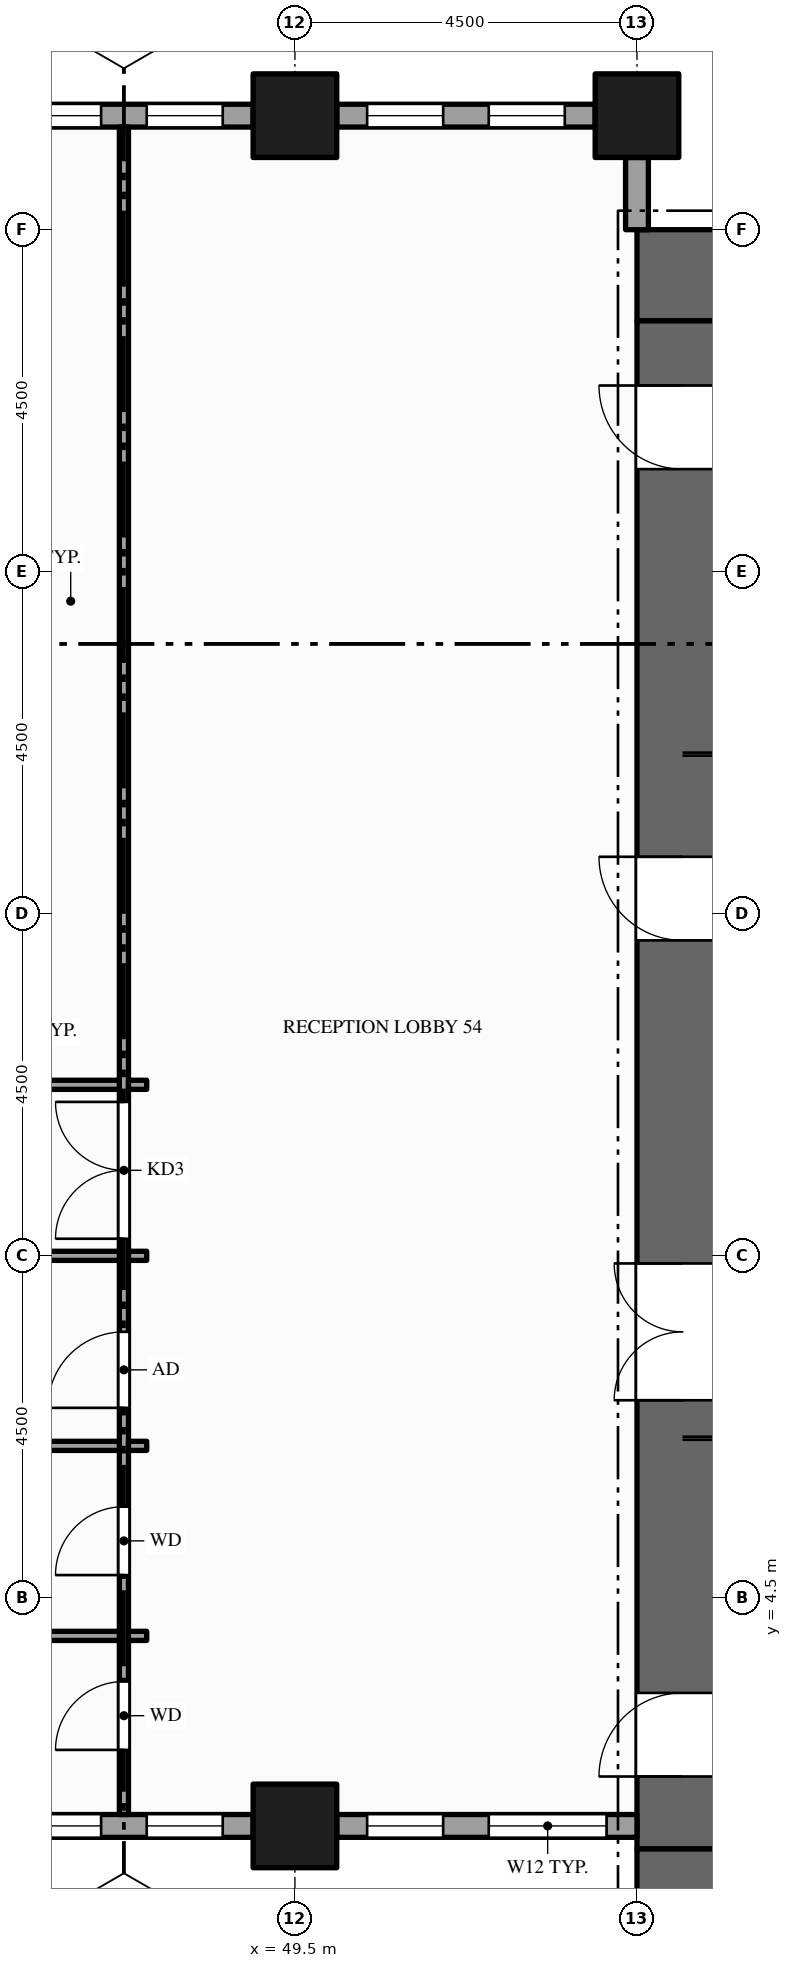
"""IFC4 building model, lengths in metres.
Left out: names, types, materials, properties, quantities, classifications, styles, units other than length and angle.
Written with IfcOpenShell. Run it as: python <this file> out.ifc"""

import sys

from ifc_helpers import new_model, si_unit, direction, frame, frame_2d, origin, origin_2d, place, context, subcontext, project, spatial, rectangle, hollow_rectangle, extrude, element, fill, save


model = new_model("IFC4")
c1 = context("Model", 3, precision=1e-05, world=origin(), true_north=direction((0.0, 1.0)))
c2 = subcontext(c1, "Body", "Model", "MODEL_VIEW")
j1 = project(units=[si_unit("LENGTHUNIT", "METRE"), si_unit("PLANEANGLEUNIT", "RADIAN")], contexts=[c1])
p1 = place(None, origin())
s1 = spatial("IfcSite", under=j1, at=p1, CompositionType="ELEMENT")
p2 = place(p1, origin())
s2 = spatial("IfcBuilding", under=s1, at=p2, CompositionType="ELEMENT")
p3 = place(p2, frame((0.0, 0.0, 73.0)))
s3 = spatial("IfcBuildingStorey", under=s2, at=p3, CompositionType="ELEMENT", Elevation=73.0)
for number, where, z_axis, x_axis in (
    (1, (67.5, 0.6, -0.15), (0.0, 0.0, 1.0), (-1.0, 0.0, 0.0)),
    (2, (54.0, 21.9, -0.15), (0.0, 0.0, 1.0), (1.0, 0.0, 0.0)),
):
    element("IfcWall", number, at=place(p3, frame(where, z_axis=z_axis, x_axis=x_axis)), inside=s3, PredefinedType="SHEAR", context=c2, shape_type="SweptSolid", body=[
        extrude(rectangle(XDim=13.5, YDim=1.2, at=frame_2d((6.75, 0.0))), origin(), (0.0, 0.0, 1.0), 4.0),
    ])
p4 = place(p3, frame((54.6, 1.2, -0.15), z_axis=(0.0, 0.0, 1.0), x_axis=(0.0, 1.0, 0.0)))
e3 = element("IfcWall", 3, at=p4, inside=s3, PredefinedType="SHEAR", context=c2, shape_type="SweptSolid", body=[
    extrude(rectangle(XDim=20.1, YDim=1.2, at=frame_2d((10.05, 0.0))), origin(), (0.0, 0.0, 1.0), 4.0),
])
p5 = place(p4, frame((5.9, 0.0, 0.15)))
e4 = element("IfcOpeningElement", 4, at=p5, cuts=e3, PredefinedType="OPENING", context=c2, shape_type="SweptSolid", body=[
    extrude(rectangle(XDim=1.8, YDim=2.1, at=frame_2d((0.9, 1.05))), frame((0.0, 0.61, 0.0), z_axis=(0.0, -1.0, 0.0), x_axis=(1.0, 0.0, 0.0)), (0.0, 0.0, 1.0), 1.22),
])
p6 = place(p4, frame((11.95, 0.0, 0.15)))
e5 = element("IfcOpeningElement", 5, at=p6, cuts=e3, PredefinedType="OPENING", context=c2, shape_type="SweptSolid", body=[
    extrude(rectangle(XDim=1.1, YDim=2.1, at=frame_2d((0.55, 1.05))), frame((0.0, 0.61, 0.0), z_axis=(0.0, -1.0, 0.0), x_axis=(1.0, 0.0, 0.0)), (0.0, 0.0, 1.0), 1.22),
])
p7 = place(p4, frame((0.95, 0.0, 0.15)))
e6 = element("IfcOpeningElement", 6, at=p7, cuts=e3, PredefinedType="OPENING", context=c2, shape_type="SweptSolid", body=[
    extrude(rectangle(XDim=1.1, YDim=2.1, at=frame_2d((0.55, 1.05))), frame((0.0, 0.61, 0.0), z_axis=(0.0, -1.0, 0.0), x_axis=(1.0, 0.0, 0.0)), (0.0, 0.0, 1.0), 1.22),
])
p8 = place(p4, frame((18.15, 0.0, 0.15)))
e7 = element("IfcOpeningElement", 7, at=p8, cuts=e3, PredefinedType="OPENING", context=c2, shape_type="SweptSolid", body=[
    extrude(rectangle(XDim=1.1, YDim=2.1, at=frame_2d((0.55, 1.05))), frame((0.0, 0.61, 0.0), z_axis=(0.0, -1.0, 0.0), x_axis=(1.0, 0.0, 0.0)), (0.0, 0.0, 1.0), 1.22),
])
for number, where, z_axis, x_axis in (
    (8, (49.5, 1.5, -0.15), (0.0, 0.0, 1.0), (1.0, 0.0, 0.0)),
    (9, (49.5, 24.0, -0.15), (0.0, 0.0, 1.0), (1.0, 0.0, 0.0)),
    (10, (54.0, 24.0, -0.15), (0.0, 0.0, 1.0), (1.0, 0.0, 0.0)),
):
    element("IfcColumn", number, at=place(p3, frame(where, z_axis=z_axis, x_axis=x_axis)), inside=s3, PredefinedType="COLUMN", context=c2, shape_type="SweptSolid", body=[
        extrude(hollow_rectangle(XDim=1.1, YDim=1.1, WallThickness=0.06, at=origin_2d()), origin(), (0.0, 0.0, 1.0), 3.9),
    ])
p9 = place(p3, frame((45.55, 1.5, 0.0), z_axis=(0.0, 0.0, 1.0), x_axis=(1.0, 0.0, 0.0)))
e11 = element("IfcWall", 11, at=p9, inside=s3, PredefinedType="STANDARD", context=c2, shape_type="SweptSolid", body=[
    extrude(rectangle(XDim=3.4, YDim=0.3, at=frame_2d((1.7, 0.0))), origin(), (0.0, 0.0, 1.0), 2.838),
])
p10 = place(p9, frame((0.4, 0.0, 0.9)))
e12 = element("IfcOpeningElement", 12, at=p10, cuts=e11, PredefinedType="OPENING", context=c2, shape_type="SweptSolid", body=[
    extrude(rectangle(XDim=1.0, YDim=1.75, at=frame_2d((0.5, 0.875))), frame((0.0, 0.16, 0.0), z_axis=(0.0, -1.0, 0.0), x_axis=(1.0, 0.0, 0.0)), (0.0, 0.0, 1.0), 0.32),
])
p11 = place(p9, frame((2.0, 0.0, 0.9)))
e13 = element("IfcOpeningElement", 13, at=p11, cuts=e11, PredefinedType="OPENING", context=c2, shape_type="SweptSolid", body=[
    extrude(rectangle(XDim=1.0, YDim=1.75, at=frame_2d((0.5, 0.875))), frame((0.0, 0.16, 0.0), z_axis=(0.0, -1.0, 0.0), x_axis=(1.0, 0.0, 0.0)), (0.0, 0.0, 1.0), 0.32),
])
p12 = place(p3, frame((50.05, 1.5, 0.0), z_axis=(0.0, 0.0, 1.0), x_axis=(1.0, 0.0, 0.0)))
e14 = element("IfcWall", 14, at=p12, inside=s3, PredefinedType="STANDARD", context=c2, shape_type="SweptSolid", body=[
    extrude(rectangle(XDim=3.95, YDim=0.3, at=frame_2d((1.975, 0.0))), origin(), (0.0, 0.0, 1.0), 2.838),
])
p13 = place(p12, frame((0.4, 0.0, 0.9)))
e15 = element("IfcOpeningElement", 15, at=p13, cuts=e14, PredefinedType="OPENING", context=c2, shape_type="SweptSolid", body=[
    extrude(rectangle(XDim=1.0, YDim=1.75, at=frame_2d((0.5, 0.875))), frame((0.0, 0.16, 0.0), z_axis=(0.0, -1.0, 0.0), x_axis=(1.0, 0.0, 0.0)), (0.0, 0.0, 1.0), 0.32),
])
p14 = place(p12, frame((2.0, 0.0, 0.9)))
e16 = element("IfcOpeningElement", 16, at=p14, cuts=e14, PredefinedType="OPENING", context=c2, shape_type="SweptSolid", body=[
    extrude(rectangle(XDim=1.55, YDim=1.75, at=frame_2d((0.775, 0.875))), frame((0.0, 0.16, 0.0), z_axis=(0.0, -1.0, 0.0), x_axis=(1.0, 0.0, 0.0)), (0.0, 0.0, 1.0), 0.32),
])
p15 = place(p3, frame((54.0, 22.5, 0.0), z_axis=(0.0, 0.0, 1.0), x_axis=(0.0, 1.0, 0.0)))
e17 = element("IfcWall", 17, at=p15, inside=s3, PredefinedType="STANDARD", context=c2, shape_type="SweptSolid", body=[
    extrude(rectangle(XDim=0.95, YDim=0.3, at=frame_2d((0.475, 0.0))), origin(), (0.0, 0.0, 1.0), 3.044),
])
p16 = place(p3, frame((53.45, 24.0, 0.0), z_axis=(0.0, 0.0, 1.0), x_axis=(-1.0, 0.0, 0.0)))
e18 = element("IfcWall", 18, at=p16, inside=s3, PredefinedType="STANDARD", context=c2, shape_type="SweptSolid", body=[
    extrude(rectangle(XDim=3.4, YDim=0.3, at=frame_2d((1.7, 0.0))), origin(), (0.0, 0.0, 1.0), 3.044),
])
p17 = place(p16, frame((0.4, 0.0, 0.9)))
e19 = element("IfcOpeningElement", 19, at=p17, cuts=e18, PredefinedType="OPENING", context=c2, shape_type="SweptSolid", body=[
    extrude(rectangle(XDim=1.0, YDim=2.0, at=frame_2d((0.5, 1.0))), frame((0.0, 0.16, 0.0), z_axis=(0.0, -1.0, 0.0), x_axis=(1.0, 0.0, 0.0)), (0.0, 0.0, 1.0), 0.32),
])
p18 = place(p16, frame((2.0, 0.0, 0.9)))
e20 = element("IfcOpeningElement", 20, at=p18, cuts=e18, PredefinedType="OPENING", context=c2, shape_type="SweptSolid", body=[
    extrude(rectangle(XDim=1.0, YDim=2.0, at=frame_2d((0.5, 1.0))), frame((0.0, 0.16, 0.0), z_axis=(0.0, -1.0, 0.0), x_axis=(1.0, 0.0, 0.0)), (0.0, 0.0, 1.0), 0.32),
])
p19 = place(p3, frame((48.95, 24.0, 0.0), z_axis=(0.0, 0.0, 1.0), x_axis=(-1.0, 0.0, 0.0)))
e21 = element("IfcWall", 21, at=p19, inside=s3, PredefinedType="STANDARD", context=c2, shape_type="SweptSolid", body=[
    extrude(rectangle(XDim=3.4, YDim=0.3, at=frame_2d((1.7, 0.0))), origin(), (0.0, 0.0, 1.0), 3.044),
])
p20 = place(p19, frame((0.4, 0.0, 0.9)))
e22 = element("IfcOpeningElement", 22, at=p20, cuts=e21, PredefinedType="OPENING", context=c2, shape_type="SweptSolid", body=[
    extrude(rectangle(XDim=1.0, YDim=2.0, at=frame_2d((0.5, 1.0))), frame((0.0, 0.16, 0.0), z_axis=(0.0, -1.0, 0.0), x_axis=(1.0, 0.0, 0.0)), (0.0, 0.0, 1.0), 0.32),
])
p21 = place(p19, frame((2.0, 0.0, 0.9)))
e23 = element("IfcOpeningElement", 23, at=p21, cuts=e21, PredefinedType="OPENING", context=c2, shape_type="SweptSolid", body=[
    extrude(rectangle(XDim=1.0, YDim=2.0, at=frame_2d((0.5, 1.0))), frame((0.0, 0.16, 0.0), z_axis=(0.0, -1.0, 0.0), x_axis=(1.0, 0.0, 0.0)), (0.0, 0.0, 1.0), 0.32),
])
p22 = place(p3, frame((47.25, 1.65, 0.0), z_axis=(0.0, 0.0, 1.0), x_axis=(0.0, 1.0, 0.0)))
e24 = element("IfcWall", 24, at=p22, inside=s3, PredefinedType="PARTITIONING", context=c2, shape_type="SweptSolid", body=[
    extrude(rectangle(XDim=22.2, YDim=0.12, at=frame_2d((11.1, 0.0))), origin(), (0.0, 0.0, 1.0), 2.838),
])
p23 = place(p22, frame((7.575, 0.0, 0.0)))
e25 = element("IfcOpeningElement", 25, at=p23, cuts=e24, PredefinedType="OPENING", context=c2, shape_type="SweptSolid", body=[
    extrude(rectangle(XDim=1.8, YDim=2.1, at=frame_2d((0.9, 1.05))), frame((0.0, 0.07, 0.0), z_axis=(0.0, -1.0, 0.0), x_axis=(1.0, 0.0, 0.0)), (0.0, 0.0, 1.0), 0.14),
])
p24 = place(p22, frame((0.85, 0.0, 0.0)))
e26 = element("IfcOpeningElement", 26, at=p24, cuts=e24, PredefinedType="OPENING", context=c2, shape_type="SweptSolid", body=[
    extrude(rectangle(XDim=0.9, YDim=2.1, at=frame_2d((0.45, 1.05))), frame((0.0, 0.07, 0.0), z_axis=(0.0, -1.0, 0.0), x_axis=(1.0, 0.0, 0.0)), (0.0, 0.0, 1.0), 0.14),
])
p25 = place(p22, frame((3.15, 0.0, 0.0)))
e27 = element("IfcOpeningElement", 27, at=p25, cuts=e24, PredefinedType="OPENING", context=c2, shape_type="SweptSolid", body=[
    extrude(rectangle(XDim=0.9, YDim=2.1, at=frame_2d((0.45, 1.05))), frame((0.0, 0.07, 0.0), z_axis=(0.0, -1.0, 0.0), x_axis=(1.0, 0.0, 0.0)), (0.0, 0.0, 1.0), 0.14),
])
p26 = place(p22, frame((5.35, 0.0, 0.0)))
e28 = element("IfcOpeningElement", 28, at=p26, cuts=e24, PredefinedType="OPENING", context=c2, shape_type="SweptSolid", body=[
    extrude(rectangle(XDim=1.0, YDim=2.1, at=frame_2d((0.5, 1.05))), frame((0.0, 0.07, 0.0), z_axis=(0.0, -1.0, 0.0), x_axis=(1.0, 0.0, 0.0)), (0.0, 0.0, 1.0), 0.14),
])
p27 = place(p3, frame((42.81, 4.0, 0.0), z_axis=(0.0, 0.0, 1.0), x_axis=(1.0, 0.0, 0.0)))
e29 = element("IfcWall", 29, at=p27, inside=s3, PredefinedType="PARTITIONING", context=c2, shape_type="SweptSolid", body=[
    extrude(rectangle(XDim=4.38, YDim=0.12, at=frame_2d((2.19, 0.0))), origin(), (0.0, 0.0, 1.0), 2.838),
])
p28 = place(p3, frame((47.31, 4.0, 0.0), z_axis=(0.0, 0.0, 1.0), x_axis=(1.0, 0.0, 0.0)))
e30 = element("IfcWall", 30, at=p28, inside=s3, PredefinedType="PARTITIONING", context=c2, shape_type="SweptSolid", body=[
    extrude(rectangle(XDim=0.24, YDim=0.12, at=frame_2d((0.12, 0.0))), origin(), (0.0, 0.0, 1.0), 2.838),
])
p29 = place(p3, frame((42.81, 6.5, 0.0), z_axis=(0.0, 0.0, 1.0), x_axis=(1.0, 0.0, 0.0)))
e31 = element("IfcWall", 31, at=p29, inside=s3, PredefinedType="PARTITIONING", context=c2, shape_type="SweptSolid", body=[
    extrude(rectangle(XDim=4.38, YDim=0.12, at=frame_2d((2.19, 0.0))), origin(), (0.0, 0.0, 1.0), 2.838),
])
p30 = place(p3, frame((47.31, 6.5, 0.0), z_axis=(0.0, 0.0, 1.0), x_axis=(1.0, 0.0, 0.0)))
e32 = element("IfcWall", 32, at=p30, inside=s3, PredefinedType="PARTITIONING", context=c2, shape_type="SweptSolid", body=[
    extrude(rectangle(XDim=0.24, YDim=0.12, at=frame_2d((0.12, 0.0))), origin(), (0.0, 0.0, 1.0), 2.838),
])
p31 = place(p3, frame((42.81, 9.0, 0.0), z_axis=(0.0, 0.0, 1.0), x_axis=(1.0, 0.0, 0.0)))
e33 = element("IfcWall", 33, at=p31, inside=s3, PredefinedType="PARTITIONING", context=c2, shape_type="SweptSolid", body=[
    extrude(rectangle(XDim=4.38, YDim=0.12, at=frame_2d((2.19, 0.0))), origin(), (0.0, 0.0, 1.0), 2.838),
])
p32 = place(p3, frame((47.31, 9.0, 0.0), z_axis=(0.0, 0.0, 1.0), x_axis=(1.0, 0.0, 0.0)))
e34 = element("IfcWall", 34, at=p32, inside=s3, PredefinedType="PARTITIONING", context=c2, shape_type="SweptSolid", body=[
    extrude(rectangle(XDim=0.24, YDim=0.12, at=frame_2d((0.12, 0.0))), origin(), (0.0, 0.0, 1.0), 2.838),
])
p33 = place(p3, frame((40.56, 11.25, 0.0), z_axis=(0.0, 0.0, 1.0), x_axis=(1.0, 0.0, 0.0)))
e35 = element("IfcWall", 35, at=p33, inside=s3, PredefinedType="PARTITIONING", context=c2, shape_type="SweptSolid", body=[
    extrude(rectangle(XDim=6.63, YDim=0.12, at=frame_2d((3.315, 0.0))), origin(), (0.0, 0.0, 1.0), 2.838),
])
p34 = place(p33, frame((2.865, 0.0, 0.0)))
e36 = element("IfcOpeningElement", 36, at=p34, cuts=e35, PredefinedType="OPENING", context=c2, shape_type="SweptSolid", body=[
    extrude(rectangle(XDim=0.9, YDim=2.1, at=frame_2d((0.45, 1.05))), frame((0.0, 0.07, 0.0), z_axis=(0.0, -1.0, 0.0), x_axis=(1.0, 0.0, 0.0)), (0.0, 0.0, 1.0), 0.14),
])
p35 = place(p3, frame((47.31, 11.25, 0.0), z_axis=(0.0, 0.0, 1.0), x_axis=(1.0, 0.0, 0.0)))
e37 = element("IfcWall", 37, at=p35, inside=s3, PredefinedType="PARTITIONING", context=c2, shape_type="SweptSolid", body=[
    extrude(rectangle(XDim=0.24, YDim=0.12, at=frame_2d((0.12, 0.0))), origin(), (0.0, 0.0, 1.0), 2.838),
])
p36 = place(p10, origin())
e38 = element("IfcWindow", 38, at=p36, inside=s3, PartitioningType="SINGLE_PANEL", PredefinedType="WINDOW", context=c2, shape_type="SweptSolid", body=[
    extrude(rectangle(XDim=1.0, YDim=1.75, at=frame_2d((0.5, 0.875))), frame((0.0, 0.03, 0.0), z_axis=(0.0, -1.0, 0.0), x_axis=(1.0, 0.0, 0.0)), (0.0, 0.0, 1.0), 0.06),
])
fill(e12, e38)
p37 = place(p11, origin())
e39 = element("IfcWindow", 39, at=p37, inside=s3, PartitioningType="SINGLE_PANEL", PredefinedType="WINDOW", context=c2, shape_type="SweptSolid", body=[
    extrude(rectangle(XDim=1.0, YDim=1.75, at=frame_2d((0.5, 0.875))), frame((0.0, 0.03, 0.0), z_axis=(0.0, -1.0, 0.0), x_axis=(1.0, 0.0, 0.0)), (0.0, 0.0, 1.0), 0.06),
])
fill(e13, e39)
p38 = place(p13, origin())
e40 = element("IfcWindow", 40, at=p38, inside=s3, PartitioningType="SINGLE_PANEL", PredefinedType="WINDOW", context=c2, shape_type="SweptSolid", body=[
    extrude(rectangle(XDim=1.0, YDim=1.75, at=frame_2d((0.5, 0.875))), frame((0.0, 0.03, 0.0), z_axis=(0.0, -1.0, 0.0), x_axis=(1.0, 0.0, 0.0)), (0.0, 0.0, 1.0), 0.06),
])
fill(e15, e40)
p39 = place(p14, origin())
e41 = element("IfcWindow", 41, at=p39, inside=s3, PartitioningType="SINGLE_PANEL", PredefinedType="WINDOW", context=c2, shape_type="SweptSolid", body=[
    extrude(rectangle(XDim=1.55, YDim=1.75, at=frame_2d((0.775, 0.875))), frame((0.0, 0.03, 0.0), z_axis=(0.0, -1.0, 0.0), x_axis=(1.0, 0.0, 0.0)), (0.0, 0.0, 1.0), 0.06),
])
fill(e16, e41)
p40 = place(p17, origin())
e42 = element("IfcWindow", 42, at=p40, inside=s3, PartitioningType="SINGLE_PANEL", PredefinedType="WINDOW", context=c2, shape_type="SweptSolid", body=[
    extrude(rectangle(XDim=1.0, YDim=2.0, at=frame_2d((0.5, 1.0))), frame((0.0, 0.03, 0.0), z_axis=(0.0, -1.0, 0.0), x_axis=(1.0, 0.0, 0.0)), (0.0, 0.0, 1.0), 0.06),
])
fill(e19, e42)
p41 = place(p18, origin())
e43 = element("IfcWindow", 43, at=p41, inside=s3, PartitioningType="SINGLE_PANEL", PredefinedType="WINDOW", context=c2, shape_type="SweptSolid", body=[
    extrude(rectangle(XDim=1.0, YDim=2.0, at=frame_2d((0.5, 1.0))), frame((0.0, 0.03, 0.0), z_axis=(0.0, -1.0, 0.0), x_axis=(1.0, 0.0, 0.0)), (0.0, 0.0, 1.0), 0.06),
])
fill(e20, e43)
p42 = place(p20, origin())
e44 = element("IfcWindow", 44, at=p42, inside=s3, PartitioningType="SINGLE_PANEL", PredefinedType="WINDOW", context=c2, shape_type="SweptSolid", body=[
    extrude(rectangle(XDim=1.0, YDim=2.0, at=frame_2d((0.5, 1.0))), frame((0.0, 0.03, 0.0), z_axis=(0.0, -1.0, 0.0), x_axis=(1.0, 0.0, 0.0)), (0.0, 0.0, 1.0), 0.06),
])
fill(e22, e44)
p43 = place(p21, origin())
e45 = element("IfcWindow", 45, at=p43, inside=s3, PartitioningType="SINGLE_PANEL", PredefinedType="WINDOW", context=c2, shape_type="SweptSolid", body=[
    extrude(rectangle(XDim=1.0, YDim=2.0, at=frame_2d((0.5, 1.0))), frame((0.0, 0.03, 0.0), z_axis=(0.0, -1.0, 0.0), x_axis=(1.0, 0.0, 0.0)), (0.0, 0.0, 1.0), 0.06),
])
fill(e23, e45)
p44 = place(p5, origin())
e46 = element("IfcDoor", 46, at=p44, inside=s3, OperationType="DOUBLE_DOOR_SINGLE_SWING", PredefinedType="DOOR", context=c2, shape_type="SweptSolid", body=[
    extrude(rectangle(XDim=1.8, YDim=2.1, at=frame_2d((0.9, 1.05))), frame((0.0, 0.025, 0.0), z_axis=(0.0, -1.0, 0.0), x_axis=(1.0, 0.0, 0.0)), (0.0, 0.0, 1.0), 0.05),
])
fill(e4, e46)
p45 = place(p6, origin())
e47 = element("IfcDoor", 47, at=p45, inside=s3, OperationType="SINGLE_SWING_RIGHT", PredefinedType="DOOR", context=c2, shape_type="SweptSolid", body=[
    extrude(rectangle(XDim=1.1, YDim=2.1, at=frame_2d((0.55, 1.05))), frame((0.0, 0.025, 0.0), z_axis=(0.0, -1.0, 0.0), x_axis=(1.0, 0.0, 0.0)), (0.0, 0.0, 1.0), 0.05),
])
fill(e5, e47)
p46 = place(p7, origin())
e48 = element("IfcDoor", 48, at=p46, inside=s3, OperationType="SINGLE_SWING_LEFT", PredefinedType="DOOR", context=c2, shape_type="SweptSolid", body=[
    extrude(rectangle(XDim=1.1, YDim=2.1, at=frame_2d((0.55, 1.05))), frame((0.0, 0.025, 0.0), z_axis=(0.0, -1.0, 0.0), x_axis=(1.0, 0.0, 0.0)), (0.0, 0.0, 1.0), 0.05),
])
fill(e6, e48)
p47 = place(p8, origin())
e49 = element("IfcDoor", 49, at=p47, inside=s3, OperationType="SINGLE_SWING_RIGHT", PredefinedType="DOOR", context=c2, shape_type="SweptSolid", body=[
    extrude(rectangle(XDim=1.1, YDim=2.1, at=frame_2d((0.55, 1.05))), frame((0.0, 0.025, 0.0), z_axis=(0.0, -1.0, 0.0), x_axis=(1.0, 0.0, 0.0)), (0.0, 0.0, 1.0), 0.05),
])
fill(e7, e49)
p48 = place(p23, origin())
e50 = element("IfcDoor", 50, at=p48, inside=s3, OperationType="DOUBLE_DOOR_SINGLE_SWING", PredefinedType="DOOR", context=c2, shape_type="SweptSolid", body=[
    extrude(rectangle(XDim=1.8, YDim=2.1, at=frame_2d((0.9, 1.05))), frame((0.0, 0.025, 0.0), z_axis=(0.0, -1.0, 0.0), x_axis=(1.0, 0.0, 0.0)), (0.0, 0.0, 1.0), 0.05),
])
fill(e25, e50)
p49 = place(p24, origin())
e51 = element("IfcDoor", 51, at=p49, inside=s3, OperationType="SINGLE_SWING_LEFT", PredefinedType="DOOR", context=c2, shape_type="SweptSolid", body=[
    extrude(rectangle(XDim=0.9, YDim=2.1, at=frame_2d((0.45, 1.05))), frame((0.0, 0.025, 0.0), z_axis=(0.0, -1.0, 0.0), x_axis=(1.0, 0.0, 0.0)), (0.0, 0.0, 1.0), 0.05),
])
fill(e26, e51)
p50 = place(p25, origin())
e52 = element("IfcDoor", 52, at=p50, inside=s3, OperationType="SINGLE_SWING_LEFT", PredefinedType="DOOR", context=c2, shape_type="SweptSolid", body=[
    extrude(rectangle(XDim=0.9, YDim=2.1, at=frame_2d((0.45, 1.05))), frame((0.0, 0.025, 0.0), z_axis=(0.0, -1.0, 0.0), x_axis=(1.0, 0.0, 0.0)), (0.0, 0.0, 1.0), 0.05),
])
fill(e27, e52)
p51 = place(p26, origin())
e53 = element("IfcDoor", 53, at=p51, inside=s3, OperationType="SINGLE_SWING_LEFT", PredefinedType="DOOR", context=c2, shape_type="SweptSolid", body=[
    extrude(rectangle(XDim=1.0, YDim=2.1, at=frame_2d((0.5, 1.05))), frame((0.0, 0.025, 0.0), z_axis=(0.0, -1.0, 0.0), x_axis=(1.0, 0.0, 0.0)), (0.0, 0.0, 1.0), 0.05),
])
fill(e28, e53)
save(model, sys.argv[1])
